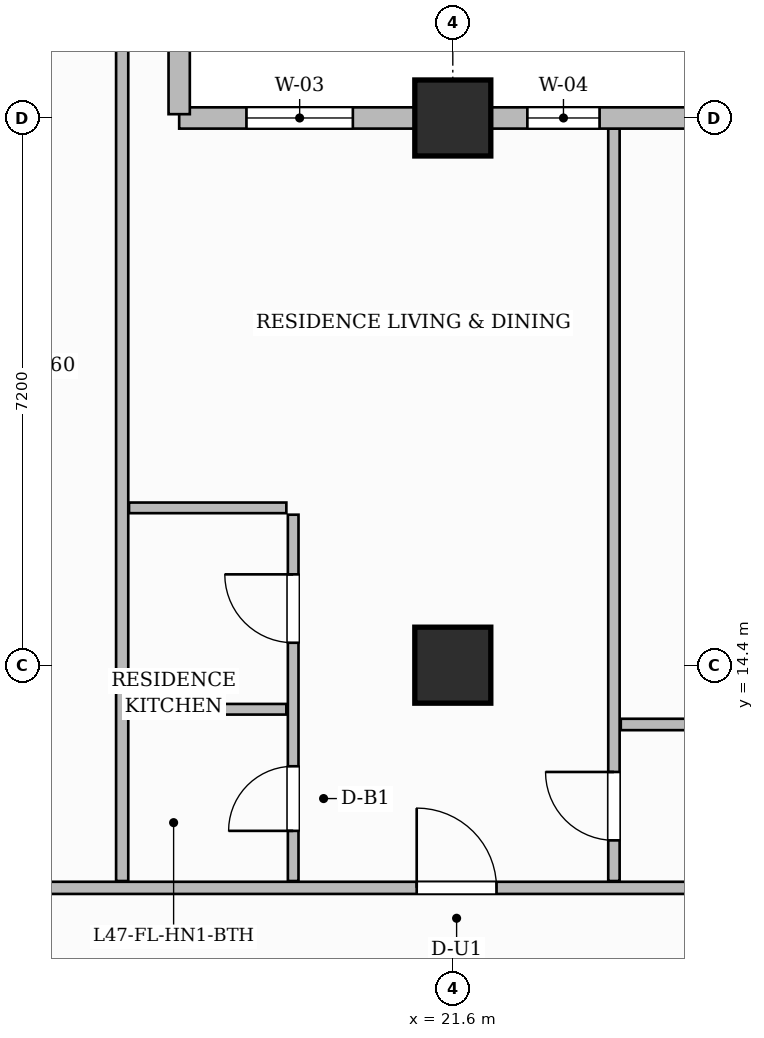
"""IFC4 building model, lengths in metres.
Left out: names, types, materials, properties, quantities, classifications, styles, units other than length and angle.
Written with IfcOpenShell. Run it as: python <this file> out.ifc"""

import sys

from ifc_helpers import new_model, si_unit, direction, frame, frame_2d, origin, origin_2d, place, context, subcontext, project, spatial, rectangle, extrude, source, transform, mapped, element, fill, save


model = new_model("IFC4")
c1 = context("Model", 3, precision=1e-05, world=origin(), true_north=direction((0.0, 1.0)))
c2 = subcontext(c1, "Body", "Model", "MODEL_VIEW")
j1 = project(units=[si_unit("LENGTHUNIT", "METRE"), si_unit("PLANEANGLEUNIT", "RADIAN")], contexts=[c1])
p1 = place(None, origin())
s1 = spatial("IfcSite", under=j1, at=p1, CompositionType="ELEMENT")
p2 = place(p1, origin())
s2 = spatial("IfcBuilding", under=s1, at=p2, CompositionType="ELEMENT")
p3 = place(p2, frame((0.0, 0.0, 188.8)))
s3 = spatial("IfcBuildingStorey", under=s2, at=p3, CompositionType="ELEMENT", Elevation=188.8)
m1 = source(origin(), c2, "Body", "SweptSolid", [
    extrude(rectangle(XDim=1.0, YDim=1.0, at=origin_2d()), origin(), (0.0, 0.0, 1.0), 3.85),
])
for number, where, z_axis, x_axis in (
    (1, (21.6, 14.4, 0.0), (0.0, 0.0, 1.0), (1.0, 0.0, 0.0)),
    (2, (21.6, 21.6, 0.0), (0.0, 0.0, 1.0), (1.0, 0.0, 0.0)),
):
    element("IfcColumn", number, at=place(p3, frame(where, z_axis=z_axis, x_axis=x_axis)), inside=s3, PredefinedType="COLUMN", context=c2, shape_type="MappedRepresentation", body=[
        mapped(m1, transform((0.0, 0.0, 0.0), scale=1.0)),
    ])
p4 = place(p3, frame((14.548, 11.47, 0.0), z_axis=(0.0, 0.0, 1.0), x_axis=(1.0, 0.0, 0.0)))
e3 = element("IfcWall", 3, at=p4, inside=s3, PredefinedType="PARTITIONING", context=c2, shape_type="SweptSolid", body=[
    extrude(rectangle(XDim=15.562, YDim=0.16, at=frame_2d((7.781, 0.0))), origin(), (0.0, 0.0, 1.0), 3.6),
])
p5 = place(p4, frame((6.577, 0.0, 0.0)))
e4 = element("IfcOpeningElement", 4, at=p5, cuts=e3, PredefinedType="OPENING", context=c2, shape_type="SweptSolid", body=[
    extrude(rectangle(XDim=1.05, YDim=2.25, at=frame_2d((0.525, 1.125))), frame((0.0, 0.09, 0.0), z_axis=(0.0, -1.0, 0.0), x_axis=(1.0, 0.0, 0.0)), (0.0, 0.0, 1.0), 0.18),
])
p6 = place(p3, frame((17.25, 11.56, 0.0), z_axis=(0.0, 0.0, 1.0), x_axis=(0.0, 1.0, 0.0)))
e5 = element("IfcWall", 5, at=p6, inside=s3, PredefinedType="PARTITIONING", context=c2, shape_type="SweptSolid", body=[
    extrude(rectangle(XDim=13.55, YDim=0.16, at=frame_2d((6.775, 0.0))), origin(), (0.0, 0.0, 1.0), 3.6),
])
p7 = place(p3, frame((19.5, 11.56, 0.0), z_axis=(0.0, 0.0, 1.0), x_axis=(0.0, 1.0, 0.0)))
e6 = element("IfcWall", 6, at=p7, inside=s3, PredefinedType="PARTITIONING", context=c2, shape_type="SweptSolid", body=[
    extrude(rectangle(XDim=4.82, YDim=0.14, at=frame_2d((2.41, 0.0))), origin(), (0.0, 0.0, 1.0), 3.6),
])
p8 = place(p7, frame((0.66, 0.0, 0.0)))
e7 = element("IfcOpeningElement", 7, at=p8, cuts=e6, PredefinedType="OPENING", context=c2, shape_type="SweptSolid", body=[
    extrude(rectangle(XDim=0.85, YDim=2.1, at=frame_2d((0.425, 1.05))), frame((0.0, 0.08, 0.0), z_axis=(0.0, -1.0, 0.0), x_axis=(1.0, 0.0, 0.0)), (0.0, 0.0, 1.0), 0.16),
])
p9 = place(p7, frame((3.135, 0.0, 0.0)))
e8 = element("IfcOpeningElement", 8, at=p9, cuts=e6, PredefinedType="OPENING", context=c2, shape_type="SweptSolid", body=[
    extrude(rectangle(XDim=0.9, YDim=2.15, at=frame_2d((0.45, 1.075))), frame((0.0, 0.08, 0.0), z_axis=(0.0, -1.0, 0.0), x_axis=(1.0, 0.0, 0.0)), (0.0, 0.0, 1.0), 0.16),
])
for number, where, z_axis, x_axis in (
    (9, (17.34, 13.82, 0.0), (0.0, 0.0, 1.0), (1.0, 0.0, 0.0)),
    (10, (17.34, 16.47, 0.0), (0.0, 0.0, 1.0), (1.0, 0.0, 0.0)),
):
    element("IfcWall", number, at=place(p3, frame(where, z_axis=z_axis, x_axis=x_axis)), inside=s3, PredefinedType="PARTITIONING", context=c2, shape_type="SweptSolid", body=[
        extrude(rectangle(XDim=2.07, YDim=0.14, at=frame_2d((1.035, 0.0))), origin(), (0.0, 0.0, 1.0), 3.6),
    ])
p10 = place(p3, frame((23.72, 11.56, 0.0), z_axis=(0.0, 0.0, 1.0), x_axis=(0.0, 1.0, 0.0)))
e11 = element("IfcWall", 11, at=p10, inside=s3, PredefinedType="PARTITIONING", context=c2, shape_type="SweptSolid", body=[
    extrude(rectangle(XDim=9.9, YDim=0.15, at=frame_2d((4.95, 0.0))), origin(), (0.0, 0.0, 1.0), 3.6),
])
p11 = place(p10, frame((0.535, 0.0, 0.0)))
e12 = element("IfcOpeningElement", 12, at=p11, cuts=e11, PredefinedType="OPENING", context=c2, shape_type="SweptSolid", body=[
    extrude(rectangle(XDim=0.9, YDim=2.15, at=frame_2d((0.45, 1.075))), frame((0.0, 0.085, 0.0), z_axis=(0.0, -1.0, 0.0), x_axis=(1.0, 0.0, 0.0)), (0.0, 0.0, 1.0), 0.17),
])
p12 = place(p3, frame((23.81, 13.62, 0.0), z_axis=(0.0, 0.0, 1.0), x_axis=(1.0, 0.0, 0.0)))
e13 = element("IfcWall", 13, at=p12, inside=s3, PredefinedType="PARTITIONING", context=c2, shape_type="SweptSolid", body=[
    extrude(rectangle(XDim=6.3, YDim=0.15, at=frame_2d((3.15, 0.0))), origin(), (0.0, 0.0, 1.0), 3.6),
])
p13 = place(p12, frame((1.65, 0.0, 0.0)))
e14 = element("IfcOpeningElement", 14, at=p13, cuts=e13, PredefinedType="OPENING", context=c2, shape_type="SweptSolid", body=[
    extrude(rectangle(XDim=0.9, YDim=2.15, at=frame_2d((0.45, 1.075))), frame((0.0, 0.085, 0.0), z_axis=(0.0, -1.0, 0.0), x_axis=(1.0, 0.0, 0.0)), (0.0, 0.0, 1.0), 0.17),
])
p14 = place(p3, frame((18.0, 21.6, 0.0), z_axis=(0.0, 0.0, 1.0), x_axis=(1.0, 0.0, 0.0)))
e15 = element("IfcWall", 15, at=p14, inside=s3, PredefinedType="SOLIDWALL", context=c2, shape_type="SweptSolid", body=[
    extrude(rectangle(XDim=31.8, YDim=0.28, at=frame_2d((15.9, 0.0))), origin(), (0.0, 0.0, 1.0), 3.085),
])
p15 = place(p14, frame((0.885, 0.0, 0.8)))
e16 = element("IfcOpeningElement", 16, at=p15, cuts=e15, PredefinedType="OPENING", context=c2, shape_type="SweptSolid", body=[
    extrude(rectangle(XDim=1.4, YDim=1.85, at=frame_2d((0.7, 0.925))), frame((0.0, 0.15, 0.0), z_axis=(0.0, -1.0, 0.0), x_axis=(1.0, 0.0, 0.0)), (0.0, 0.0, 1.0), 0.3),
])
p16 = place(p14, frame((4.581, 0.0, 0.8)))
e17 = element("IfcOpeningElement", 17, at=p16, cuts=e15, PredefinedType="OPENING", context=c2, shape_type="SweptSolid", body=[
    extrude(rectangle(XDim=0.95, YDim=1.75, at=frame_2d((0.475, 0.875))), frame((0.0, 0.15, 0.0), z_axis=(0.0, -1.0, 0.0), x_axis=(1.0, 0.0, 0.0)), (0.0, 0.0, 1.0), 0.3),
])
p17 = place(p14, frame((6.964, 0.0, 0.8)))
e18 = element("IfcOpeningElement", 18, at=p17, cuts=e15, PredefinedType="OPENING", context=c2, shape_type="SweptSolid", body=[
    extrude(rectangle(XDim=1.8, YDim=1.85, at=frame_2d((0.9, 0.925))), frame((0.0, 0.15, 0.0), z_axis=(0.0, -1.0, 0.0), x_axis=(1.0, 0.0, 0.0)), (0.0, 0.0, 1.0), 0.3),
])
p18 = place(p14, frame((13.001, 0.0, 0.8)))
e19 = element("IfcOpeningElement", 19, at=p18, cuts=e15, PredefinedType="OPENING", context=c2, shape_type="SweptSolid", body=[
    extrude(rectangle(XDim=1.8, YDim=1.85, at=frame_2d((0.9, 0.925))), frame((0.0, 0.15, 0.0), z_axis=(0.0, -1.0, 0.0), x_axis=(1.0, 0.0, 0.0)), (0.0, 0.0, 1.0), 0.3),
])
p19 = place(p14, frame((18.123, 0.0, 0.8)))
e20 = element("IfcOpeningElement", 20, at=p19, cuts=e15, PredefinedType="OPENING", context=c2, shape_type="SweptSolid", body=[
    extrude(rectangle(XDim=1.8, YDim=1.85, at=frame_2d((0.9, 0.925))), frame((0.0, 0.15, 0.0), z_axis=(0.0, -1.0, 0.0), x_axis=(1.0, 0.0, 0.0)), (0.0, 0.0, 1.0), 0.3),
])
p20 = place(p14, frame((20.869, 0.0, 0.8)))
e21 = element("IfcOpeningElement", 21, at=p20, cuts=e15, PredefinedType="OPENING", context=c2, shape_type="SweptSolid", body=[
    extrude(rectangle(XDim=1.8, YDim=1.85, at=frame_2d((0.9, 0.925))), frame((0.0, 0.15, 0.0), z_axis=(0.0, -1.0, 0.0), x_axis=(1.0, 0.0, 0.0)), (0.0, 0.0, 1.0), 0.3),
])
p21 = place(p14, frame((25.475, 0.0, 0.8)))
e22 = element("IfcOpeningElement", 22, at=p21, cuts=e15, PredefinedType="OPENING", context=c2, shape_type="SweptSolid", body=[
    extrude(rectangle(XDim=1.8, YDim=1.85, at=frame_2d((0.9, 0.925))), frame((0.0, 0.15, 0.0), z_axis=(0.0, -1.0, 0.0), x_axis=(1.0, 0.0, 0.0)), (0.0, 0.0, 1.0), 0.3),
])
p22 = place(p14, frame((28.525, 0.0, 0.8)))
e23 = element("IfcOpeningElement", 23, at=p22, cuts=e15, PredefinedType="OPENING", context=c2, shape_type="SweptSolid", body=[
    extrude(rectangle(XDim=1.8, YDim=1.85, at=frame_2d((0.9, 0.925))), frame((0.0, 0.15, 0.0), z_axis=(0.0, -1.0, 0.0), x_axis=(1.0, 0.0, 0.0)), (0.0, 0.0, 1.0), 0.3),
])
p23 = place(p3, frame((18.0, 21.65, 0.0), z_axis=(0.0, 0.0, 1.0), x_axis=(0.0, 1.0, 0.0)))
e24 = element("IfcWall", 24, at=p23, inside=s3, PredefinedType="SOLIDWALL", context=c2, shape_type="SweptSolid", body=[
    extrude(rectangle(XDim=25.1, YDim=0.28, at=frame_2d((12.55, 0.0))), origin(), (0.0, 0.0, 1.0), 3.6),
])
p24 = place(p23, frame((12.25, 0.0, 0.0)))
e25 = element("IfcOpeningElement", 25, at=p24, cuts=e24, PredefinedType="OPENING", context=c2, shape_type="SweptSolid", body=[
    extrude(rectangle(XDim=1.2, YDim=2.2, at=frame_2d((0.6, 1.1))), frame((0.0, 0.15, 0.0), z_axis=(0.0, -1.0, 0.0), x_axis=(1.0, 0.0, 0.0)), (0.0, 0.0, 1.0), 0.3),
])
p25 = place(p23, frame((1.89, 0.0, 0.8)))
e26 = element("IfcOpeningElement", 26, at=p25, cuts=e24, PredefinedType="OPENING", context=c2, shape_type="SweptSolid", body=[
    extrude(rectangle(XDim=1.8, YDim=1.85, at=frame_2d((0.9, 0.925))), frame((0.0, 0.15, 0.0), z_axis=(0.0, -1.0, 0.0), x_axis=(1.0, 0.0, 0.0)), (0.0, 0.0, 1.0), 0.3),
])
p26 = place(p23, frame((6.63, 0.0, 0.8)))
e27 = element("IfcOpeningElement", 27, at=p26, cuts=e24, PredefinedType="OPENING", context=c2, shape_type="SweptSolid", body=[
    extrude(rectangle(XDim=1.8, YDim=1.85, at=frame_2d((0.9, 0.925))), frame((0.0, 0.15, 0.0), z_axis=(0.0, -1.0, 0.0), x_axis=(1.0, 0.0, 0.0)), (0.0, 0.0, 1.0), 0.3),
])
p27 = place(p23, frame((14.55, 0.0, 0.8)))
e28 = element("IfcOpeningElement", 28, at=p27, cuts=e24, PredefinedType="OPENING", context=c2, shape_type="SweptSolid", body=[
    extrude(rectangle(XDim=1.8, YDim=1.85, at=frame_2d((0.9, 0.925))), frame((0.0, 0.15, 0.0), z_axis=(0.0, -1.0, 0.0), x_axis=(1.0, 0.0, 0.0)), (0.0, 0.0, 1.0), 0.3),
])
p28 = place(p23, frame((19.275, 0.0, 0.8)))
e29 = element("IfcOpeningElement", 29, at=p28, cuts=e24, PredefinedType="OPENING", context=c2, shape_type="SweptSolid", body=[
    extrude(rectangle(XDim=1.8, YDim=1.85, at=frame_2d((0.9, 0.925))), frame((0.0, 0.15, 0.0), z_axis=(0.0, -1.0, 0.0), x_axis=(1.0, 0.0, 0.0)), (0.0, 0.0, 1.0), 0.3),
])
p29 = place(p23, frame((22.025, 0.0, 0.8)))
e30 = element("IfcOpeningElement", 30, at=p29, cuts=e24, PredefinedType="OPENING", context=c2, shape_type="SweptSolid", body=[
    extrude(rectangle(XDim=1.8, YDim=1.85, at=frame_2d((0.9, 0.925))), frame((0.0, 0.15, 0.0), z_axis=(0.0, -1.0, 0.0), x_axis=(1.0, 0.0, 0.0)), (0.0, 0.0, 1.0), 0.3),
])
m2 = source(origin(), c2, "Body", "SweptSolid", [
    extrude(rectangle(XDim=0.85, YDim=2.1, at=frame_2d((0.425, 1.05))), frame((0.0, 0.025, 0.0), z_axis=(0.0, -1.0, 0.0), x_axis=(1.0, 0.0, 0.0)), (0.0, 0.0, 1.0), 0.05),
])
p30 = place(p8, origin())
e31 = element("IfcDoor", 31, at=p30, inside=s3, OperationType="SINGLE_SWING_LEFT", PredefinedType="DOOR", context=c2, shape_type="MappedRepresentation", body=[
    mapped(m2, transform((0.0, 0.0, 0.0), scale=1.0)),
])
fill(e7, e31)
m3 = source(origin(), c2, "Body", "SweptSolid", [
    extrude(rectangle(XDim=0.9, YDim=2.15, at=frame_2d((0.45, 1.075))), frame((0.0, 0.025, 0.0), z_axis=(0.0, -1.0, 0.0), x_axis=(1.0, 0.0, 0.0)), (0.0, 0.0, 1.0), 0.05),
])
p31 = place(p9, origin())
e32 = element("IfcDoor", 32, at=p31, inside=s3, OperationType="SINGLE_SWING_RIGHT", PredefinedType="DOOR", context=c2, shape_type="MappedRepresentation", body=[
    mapped(m3, transform((0.0, 0.0, 0.0), scale=1.0)),
])
fill(e8, e32)
m4 = source(origin(), c2, "Body", "SweptSolid", [
    extrude(rectangle(XDim=1.05, YDim=2.25, at=frame_2d((0.525, 1.125))), frame((0.0, 0.025, 0.0), z_axis=(0.0, -1.0, 0.0), x_axis=(1.0, 0.0, 0.0)), (0.0, 0.0, 1.0), 0.05),
])
p32 = place(p5, origin())
e33 = element("IfcDoor", 33, at=p32, inside=s3, OperationType="SINGLE_SWING_LEFT", PredefinedType="DOOR", context=c2, shape_type="MappedRepresentation", body=[
    mapped(m4, transform((0.0, 0.0, 0.0), scale=1.0)),
])
fill(e4, e33)
p33 = place(p11, origin())
e34 = element("IfcDoor", 34, at=p33, inside=s3, OperationType="SINGLE_SWING_RIGHT", PredefinedType="DOOR", context=c2, shape_type="MappedRepresentation", body=[
    mapped(m3, transform((0.0, 0.0, 0.0), scale=1.0)),
])
fill(e12, e34)
m5 = source(origin(), c2, "Body", "SweptSolid", [
    extrude(rectangle(XDim=1.4, YDim=1.85, at=frame_2d((0.7, 0.925))), frame((0.0, 0.03, 0.0), z_axis=(0.0, -1.0, 0.0), x_axis=(1.0, 0.0, 0.0)), (0.0, 0.0, 1.0), 0.06),
])
p34 = place(p15, origin())
e35 = element("IfcWindow", 35, at=p34, inside=s3, PartitioningType="SINGLE_PANEL", PredefinedType="WINDOW", context=c2, shape_type="MappedRepresentation", body=[
    mapped(m5, transform((0.0, 0.0, 0.0), scale=1.0)),
])
fill(e16, e35)
m6 = source(origin(), c2, "Body", "SweptSolid", [
    extrude(rectangle(XDim=0.95, YDim=1.75, at=frame_2d((0.475, 0.875))), frame((0.0, 0.03, 0.0), z_axis=(0.0, -1.0, 0.0), x_axis=(1.0, 0.0, 0.0)), (0.0, 0.0, 1.0), 0.06),
])
p35 = place(p16, origin())
e36 = element("IfcWindow", 36, at=p35, inside=s3, PartitioningType="SINGLE_PANEL", PredefinedType="WINDOW", context=c2, shape_type="MappedRepresentation", body=[
    mapped(m6, transform((0.0, 0.0, 0.0), scale=1.0)),
])
fill(e17, e36)
save(model, sys.argv[1])
